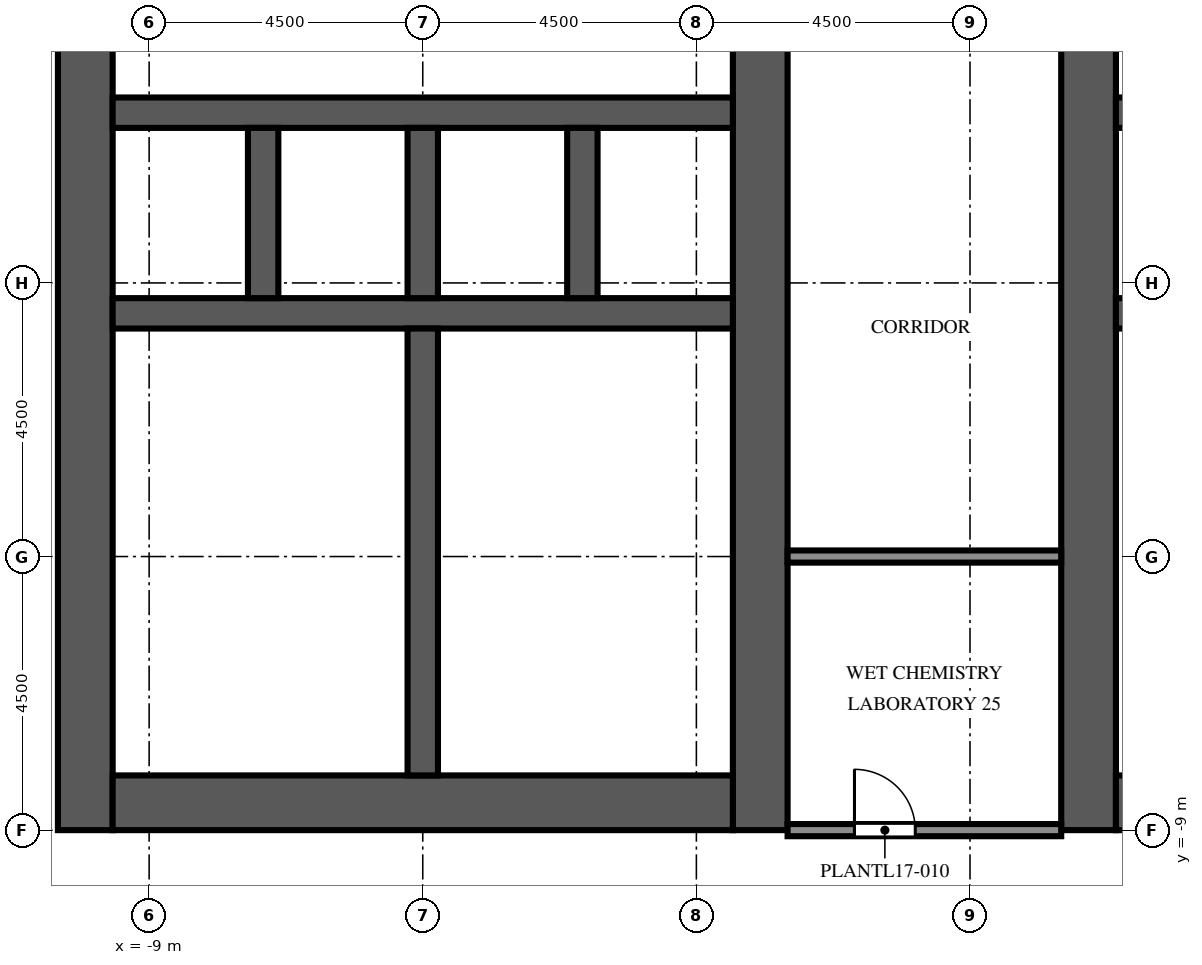
"""IFC4 building model, lengths in metres.
Left out: names, types, materials, properties, quantities, classifications, styles, units other than length and angle.
Written with IfcOpenShell. Run it as: python <this file> out.ifc"""

import sys

from ifc_helpers import new_model, si_unit, direction, frame, frame_2d, origin, place, context, subcontext, project, spatial, rectangle, extrude, element, fill, save


model = new_model("IFC4")
c1 = context("Model", 3, precision=1e-05, world=origin(), true_north=direction((0.0, 1.0)))
c2 = subcontext(c1, "Body", "Model", "MODEL_VIEW")
j1 = project(units=[si_unit("LENGTHUNIT", "METRE"), si_unit("PLANEANGLEUNIT", "RADIAN")], contexts=[c1])
p1 = place(None, origin())
s1 = spatial("IfcSite", under=j1, at=p1, CompositionType="ELEMENT")
p2 = place(p1, origin())
s2 = spatial("IfcBuilding", under=s1, at=p2, CompositionType="ELEMENT")
p3 = place(p2, frame((0.0, 0.0, 76.6)))
s3 = spatial("IfcBuildingStorey", under=s2, at=p3, CompositionType="ELEMENT", Elevation=76.6)
p4 = place(p3, frame((-10.05, -9.0, 0.0), z_axis=(0.0, 0.0, 1.0), x_axis=(0.0, 1.0, 0.0)))
e1 = element("IfcWall", 1, at=p4, inside=s3, PredefinedType="SHEAR", context=c2, shape_type="SweptSolid", body=[
    extrude(rectangle(XDim=27.5, YDim=0.9, at=frame_2d((13.75, 0.0))), origin(), (0.0, 0.0, 1.0), 5.4),
])
p5 = place(p4, frame((12.55, 0.0, 0.0)))
e2 = element("IfcOpeningElement", 2, at=p5, cuts=e1, PredefinedType="OPENING", context=c2, shape_type="SweptSolid", body=[
    extrude(rectangle(XDim=2.4, YDim=2.4, at=frame_2d((1.2, 1.2))), frame((0.0, 0.46, 0.0), z_axis=(0.0, -1.0, 0.0), x_axis=(1.0, 0.0, 0.0)), (0.0, 0.0, 1.0), 0.92),
])
p6 = place(p4, frame((6.825, 0.0, 0.0)))
e3 = element("IfcOpeningElement", 3, at=p6, cuts=e1, PredefinedType="OPENING", context=c2, shape_type="SweptSolid", body=[
    extrude(rectangle(XDim=1.2, YDim=2.1, at=frame_2d((0.6, 1.05))), frame((0.0, 0.46, 0.0), z_axis=(0.0, -1.0, 0.0), x_axis=(1.0, 0.0, 0.0)), (0.0, 0.0, 1.0), 0.92),
])
p7 = place(p4, frame((19.475, 0.0, 0.0)))
e4 = element("IfcOpeningElement", 4, at=p7, cuts=e1, PredefinedType="OPENING", context=c2, shape_type="SweptSolid", body=[
    extrude(rectangle(XDim=1.2, YDim=2.1, at=frame_2d((0.6, 1.05))), frame((0.0, 0.46, 0.0), z_axis=(0.0, -1.0, 0.0), x_axis=(1.0, 0.0, 0.0)), (0.0, 0.0, 1.0), 0.92),
])
p8 = place(p3, frame((1.05, -9.0, 0.0), z_axis=(0.0, 0.0, 1.0), x_axis=(0.0, 1.0, 0.0)))
e5 = element("IfcWall", 5, at=p8, inside=s3, PredefinedType="SHEAR", context=c2, shape_type="SweptSolid", body=[
    extrude(rectangle(XDim=27.5, YDim=0.9, at=frame_2d((13.75, 0.0))), origin(), (0.0, 0.0, 1.0), 5.4),
])
p9 = place(p8, frame((12.55, 0.0, 0.0)))
e6 = element("IfcOpeningElement", 6, at=p9, cuts=e5, PredefinedType="OPENING", context=c2, shape_type="SweptSolid", body=[
    extrude(rectangle(XDim=2.4, YDim=2.4, at=frame_2d((1.2, 1.2))), frame((0.0, 0.46, 0.0), z_axis=(0.0, -1.0, 0.0), x_axis=(1.0, 0.0, 0.0)), (0.0, 0.0, 1.0), 0.92),
])
p10 = place(p8, frame((5.445, 0.0, 0.0)))
e7 = element("IfcOpeningElement", 7, at=p10, cuts=e5, PredefinedType="OPENING", context=c2, shape_type="SweptSolid", body=[
    extrude(rectangle(XDim=1.2, YDim=2.1, at=frame_2d((0.6, 1.05))), frame((0.0, 0.46, 0.0), z_axis=(0.0, -1.0, 0.0), x_axis=(1.0, 0.0, 0.0)), (0.0, 0.0, 1.0), 0.92),
])
p11 = place(p8, frame((19.485, 0.0, 0.0)))
e8 = element("IfcOpeningElement", 8, at=p11, cuts=e5, PredefinedType="OPENING", context=c2, shape_type="SweptSolid", body=[
    extrude(rectangle(XDim=1.0, YDim=2.1, at=frame_2d((0.5, 1.05))), frame((0.0, 0.46, 0.0), z_axis=(0.0, -1.0, 0.0), x_axis=(1.0, 0.0, 0.0)), (0.0, 0.0, 1.0), 0.92),
])
p12 = place(p8, frame((21.139, 0.0, 0.0)))
e9 = element("IfcOpeningElement", 9, at=p12, cuts=e5, PredefinedType="OPENING", context=c2, shape_type="SweptSolid", body=[
    extrude(rectangle(XDim=1.0, YDim=2.1, at=frame_2d((0.5, 1.05))), frame((0.0, 0.46, 0.0), z_axis=(0.0, -1.0, 0.0), x_axis=(1.0, 0.0, 0.0)), (0.0, 0.0, 1.0), 0.92),
])
p13 = place(p8, frame((23.16, 0.0, 0.0)))
e10 = element("IfcOpeningElement", 10, at=p13, cuts=e5, PredefinedType="OPENING", context=c2, shape_type="SweptSolid", body=[
    extrude(rectangle(XDim=1.0, YDim=2.1, at=frame_2d((0.5, 1.05))), frame((0.0, 0.46, 0.0), z_axis=(0.0, -1.0, 0.0), x_axis=(1.0, 0.0, 0.0)), (0.0, 0.0, 1.0), 0.92),
])
p14 = place(p8, frame((25.181, 0.0, 0.0)))
e11 = element("IfcOpeningElement", 11, at=p14, cuts=e5, PredefinedType="OPENING", context=c2, shape_type="SweptSolid", body=[
    extrude(rectangle(XDim=1.0, YDim=2.1, at=frame_2d((0.5, 1.05))), frame((0.0, 0.46, 0.0), z_axis=(0.0, -1.0, 0.0), x_axis=(1.0, 0.0, 0.0)), (0.0, 0.0, 1.0), 0.92),
])
p15 = place(p3, frame((-9.6, -8.55, 0.0), z_axis=(0.0, 0.0, 1.0), x_axis=(1.0, 0.0, 0.0)))
e12 = element("IfcWall", 12, at=p15, inside=s3, PredefinedType="SHEAR", context=c2, shape_type="SweptSolid", body=[
    extrude(rectangle(XDim=10.2, YDim=0.9, at=frame_2d((5.1, 0.0))), origin(), (0.0, 0.0, 1.0), 5.4),
])
p16 = place(p3, frame((-9.6, -0.5, 0.0), z_axis=(0.0, 0.0, 1.0), x_axis=(1.0, 0.0, 0.0)))
e13 = element("IfcWall", 13, at=p16, inside=s3, PredefinedType="SHEAR", context=c2, shape_type="SweptSolid", body=[
    extrude(rectangle(XDim=10.2, YDim=0.5, at=frame_2d((5.1, 0.0))), origin(), (0.0, 0.0, 1.0), 5.4),
])
p17 = place(p3, frame((-9.6, 2.8, 0.0), z_axis=(0.0, 0.0, 1.0), x_axis=(1.0, 0.0, 0.0)))
e14 = element("IfcWall", 14, at=p17, inside=s3, PredefinedType="SHEAR", context=c2, shape_type="SweptSolid", body=[
    extrude(rectangle(XDim=10.2, YDim=0.5, at=frame_2d((5.1, 0.0))), origin(), (0.0, 0.0, 1.0), 5.4),
])
p18 = place(p17, frame((0.562, 0.0, 0.0)))
e15 = element("IfcOpeningElement", 15, at=p18, cuts=e14, PredefinedType="OPENING", context=c2, shape_type="SweptSolid", body=[
    extrude(rectangle(XDim=1.1, YDim=2.1, at=frame_2d((0.55, 1.05))), frame((0.0, 0.26, 0.0), z_axis=(0.0, -1.0, 0.0), x_axis=(1.0, 0.0, 0.0)), (0.0, 0.0, 1.0), 0.52),
])
p19 = place(p17, frame((3.238, 0.0, 0.0)))
e16 = element("IfcOpeningElement", 16, at=p19, cuts=e14, PredefinedType="OPENING", context=c2, shape_type="SweptSolid", body=[
    extrude(rectangle(XDim=1.1, YDim=2.1, at=frame_2d((0.55, 1.05))), frame((0.0, 0.26, 0.0), z_axis=(0.0, -1.0, 0.0), x_axis=(1.0, 0.0, 0.0)), (0.0, 0.0, 1.0), 0.52),
])
p20 = place(p17, frame((8.538, 0.0, 0.0)))
e17 = element("IfcOpeningElement", 17, at=p20, cuts=e14, PredefinedType="OPENING", context=c2, shape_type="SweptSolid", body=[
    extrude(rectangle(XDim=1.1, YDim=2.1, at=frame_2d((0.55, 1.05))), frame((0.0, 0.26, 0.0), z_axis=(0.0, -1.0, 0.0), x_axis=(1.0, 0.0, 0.0)), (0.0, 0.0, 1.0), 0.52),
])
for number, where, z_axis, x_axis in (
    (18, (-7.125, -0.25, 0.0), (0.0, 0.0, 1.0), (0.0, 1.0, 0.0)),
    (19, (-4.5, -0.25, 0.0), (0.0, 0.0, 1.0), (0.0, 1.0, 0.0)),
    (20, (-1.875, -0.25, 0.0), (0.0, 0.0, 1.0), (0.0, 1.0, 0.0)),
):
    element("IfcWall", number, at=place(p3, frame(where, z_axis=z_axis, x_axis=x_axis)), inside=s3, PredefinedType="SHEAR", context=c2, shape_type="SweptSolid", body=[
        extrude(rectangle(XDim=2.8, YDim=0.5, at=frame_2d((1.4, 0.0))), origin(), (0.0, 0.0, 1.0), 5.4),
    ])
p21 = place(p3, frame((-4.5, -8.1, 0.0), z_axis=(0.0, 0.0, 1.0), x_axis=(0.0, 1.0, 0.0)))
e21 = element("IfcWall", 21, at=p21, inside=s3, PredefinedType="SHEAR", context=c2, shape_type="SweptSolid", body=[
    extrude(rectangle(XDim=7.35, YDim=0.5, at=frame_2d((3.675, 0.0))), origin(), (0.0, 0.0, 1.0), 5.4),
])
p22 = place(p3, frame((6.45, -9.0, 0.0), z_axis=(0.0, 0.0, 1.0), x_axis=(0.0, 1.0, 0.0)))
e22 = element("IfcWall", 22, at=p22, inside=s3, PredefinedType="SHEAR", context=c2, shape_type="SweptSolid", body=[
    extrude(rectangle(XDim=27.5, YDim=0.9, at=frame_2d((13.75, 0.0))), origin(), (0.0, 0.0, 1.0), 5.4),
])
p23 = place(p22, frame((12.55, 0.0, 0.0)))
e23 = element("IfcOpeningElement", 23, at=p23, cuts=e22, PredefinedType="OPENING", context=c2, shape_type="SweptSolid", body=[
    extrude(rectangle(XDim=2.4, YDim=2.4, at=frame_2d((1.2, 1.2))), frame((0.0, 0.46, 0.0), z_axis=(0.0, -1.0, 0.0), x_axis=(1.0, 0.0, 0.0)), (0.0, 0.0, 1.0), 0.92),
])
p24 = place(p22, frame((5.445, 0.0, 0.0)))
e24 = element("IfcOpeningElement", 24, at=p24, cuts=e22, PredefinedType="OPENING", context=c2, shape_type="SweptSolid", body=[
    extrude(rectangle(XDim=1.2, YDim=2.1, at=frame_2d((0.6, 1.05))), frame((0.0, 0.46, 0.0), z_axis=(0.0, -1.0, 0.0), x_axis=(1.0, 0.0, 0.0)), (0.0, 0.0, 1.0), 0.92),
])
p25 = place(p22, frame((19.485, 0.0, 0.0)))
e25 = element("IfcOpeningElement", 25, at=p25, cuts=e22, PredefinedType="OPENING", context=c2, shape_type="SweptSolid", body=[
    extrude(rectangle(XDim=1.0, YDim=2.1, at=frame_2d((0.5, 1.05))), frame((0.0, 0.46, 0.0), z_axis=(0.0, -1.0, 0.0), x_axis=(1.0, 0.0, 0.0)), (0.0, 0.0, 1.0), 0.92),
])
p26 = place(p22, frame((21.139, 0.0, 0.0)))
e26 = element("IfcOpeningElement", 26, at=p26, cuts=e22, PredefinedType="OPENING", context=c2, shape_type="SweptSolid", body=[
    extrude(rectangle(XDim=1.0, YDim=2.1, at=frame_2d((0.5, 1.05))), frame((0.0, 0.46, 0.0), z_axis=(0.0, -1.0, 0.0), x_axis=(1.0, 0.0, 0.0)), (0.0, 0.0, 1.0), 0.92),
])
p27 = place(p22, frame((23.16, 0.0, 0.0)))
e27 = element("IfcOpeningElement", 27, at=p27, cuts=e22, PredefinedType="OPENING", context=c2, shape_type="SweptSolid", body=[
    extrude(rectangle(XDim=1.0, YDim=2.1, at=frame_2d((0.5, 1.05))), frame((0.0, 0.46, 0.0), z_axis=(0.0, -1.0, 0.0), x_axis=(1.0, 0.0, 0.0)), (0.0, 0.0, 1.0), 0.92),
])
p28 = place(p22, frame((25.181, 0.0, 0.0)))
e28 = element("IfcOpeningElement", 28, at=p28, cuts=e22, PredefinedType="OPENING", context=c2, shape_type="SweptSolid", body=[
    extrude(rectangle(XDim=1.0, YDim=2.1, at=frame_2d((0.5, 1.05))), frame((0.0, 0.46, 0.0), z_axis=(0.0, -1.0, 0.0), x_axis=(1.0, 0.0, 0.0)), (0.0, 0.0, 1.0), 0.92),
])
p29 = place(p3, frame((6.9, -8.55, 0.0), z_axis=(0.0, 0.0, 1.0), x_axis=(1.0, 0.0, 0.0)))
e29 = element("IfcWall", 29, at=p29, inside=s3, PredefinedType="SHEAR", context=c2, shape_type="SweptSolid", body=[
    extrude(rectangle(XDim=10.2, YDim=0.9, at=frame_2d((5.1, 0.0))), origin(), (0.0, 0.0, 1.0), 5.4),
])
p30 = place(p3, frame((6.9, -0.5, 0.0), z_axis=(0.0, 0.0, 1.0), x_axis=(1.0, 0.0, 0.0)))
e30 = element("IfcWall", 30, at=p30, inside=s3, PredefinedType="SHEAR", context=c2, shape_type="SweptSolid", body=[
    extrude(rectangle(XDim=10.2, YDim=0.5, at=frame_2d((5.1, 0.0))), origin(), (0.0, 0.0, 1.0), 5.4),
])
p31 = place(p3, frame((6.9, 2.8, 0.0), z_axis=(0.0, 0.0, 1.0), x_axis=(1.0, 0.0, 0.0)))
e31 = element("IfcWall", 31, at=p31, inside=s3, PredefinedType="SHEAR", context=c2, shape_type="SweptSolid", body=[
    extrude(rectangle(XDim=10.2, YDim=0.5, at=frame_2d((5.1, 0.0))), origin(), (0.0, 0.0, 1.0), 5.4),
])
p32 = place(p31, frame((0.562, 0.0, 0.0)))
e32 = element("IfcOpeningElement", 32, at=p32, cuts=e31, PredefinedType="OPENING", context=c2, shape_type="SweptSolid", body=[
    extrude(rectangle(XDim=1.1, YDim=2.1, at=frame_2d((0.55, 1.05))), frame((0.0, 0.26, 0.0), z_axis=(0.0, -1.0, 0.0), x_axis=(1.0, 0.0, 0.0)), (0.0, 0.0, 1.0), 0.52),
])
p33 = place(p31, frame((3.238, 0.0, 0.0)))
e33 = element("IfcOpeningElement", 33, at=p33, cuts=e31, PredefinedType="OPENING", context=c2, shape_type="SweptSolid", body=[
    extrude(rectangle(XDim=1.1, YDim=2.1, at=frame_2d((0.55, 1.05))), frame((0.0, 0.26, 0.0), z_axis=(0.0, -1.0, 0.0), x_axis=(1.0, 0.0, 0.0)), (0.0, 0.0, 1.0), 0.52),
])
p34 = place(p31, frame((8.538, 0.0, 0.0)))
e34 = element("IfcOpeningElement", 34, at=p34, cuts=e31, PredefinedType="OPENING", context=c2, shape_type="SweptSolid", body=[
    extrude(rectangle(XDim=1.1, YDim=2.1, at=frame_2d((0.55, 1.05))), frame((0.0, 0.26, 0.0), z_axis=(0.0, -1.0, 0.0), x_axis=(1.0, 0.0, 0.0)), (0.0, 0.0, 1.0), 0.52),
])
p35 = place(p3, frame((-0.9, -5.16, 0.0), z_axis=(0.0, 0.0, 1.0), x_axis=(1.0, 0.0, 0.0)))
e35 = element("IfcWall", 35, at=p35, inside=s3, PredefinedType="PARTITIONING", context=c2, shape_type="SweptSolid", body=[
    extrude(rectangle(XDim=1.5, YDim=0.1, at=frame_2d((0.75, 0.0))), origin(), (0.0, 0.0, 1.0), 4.95),
])
p36 = place(p35, frame((0.25, 0.0, 0.0)))
e36 = element("IfcOpeningElement", 36, at=p36, cuts=e35, PredefinedType="OPENING", context=c2, shape_type="SweptSolid", body=[
    extrude(rectangle(XDim=1.0, YDim=2.1, at=frame_2d((0.5, 1.05))), frame((0.0, 0.06, 0.0), z_axis=(0.0, -1.0, 0.0), x_axis=(1.0, 0.0, 0.0)), (0.0, 0.0, 1.0), 0.12),
])
p37 = place(p3, frame((-0.9, -5.16, 0.0), z_axis=(0.0, 0.0, 1.0), x_axis=(0.0, 1.0, 0.0)))
e37 = element("IfcWall", 37, at=p37, inside=s3, PredefinedType="PARTITIONING", context=c2, shape_type="SweptSolid", body=[
    extrude(rectangle(XDim=2.205, YDim=0.1, at=frame_2d((1.103, 0.0))), origin(), (0.0, 0.0, 1.0), 4.95),
])
p38 = place(p37, frame((0.603, 0.0, 0.0)))
e38 = element("IfcOpeningElement", 38, at=p38, cuts=e37, PredefinedType="OPENING", context=c2, shape_type="SweptSolid", body=[
    extrude(rectangle(XDim=1.0, YDim=2.1, at=frame_2d((0.5, 1.05))), frame((0.0, 0.06, 0.0), z_axis=(0.0, -1.0, 0.0), x_axis=(1.0, 0.0, 0.0)), (0.0, 0.0, 1.0), 0.12),
])
p39 = place(p3, frame((-0.9, -2.955, 0.0), z_axis=(0.0, 0.0, 1.0), x_axis=(0.0, 1.0, 0.0)))
e39 = element("IfcWall", 39, at=p39, inside=s3, PredefinedType="PARTITIONING", context=c2, shape_type="SweptSolid", body=[
    extrude(rectangle(XDim=2.205, YDim=0.1, at=frame_2d((1.103, 0.0))), origin(), (0.0, 0.0, 1.0), 4.95),
])
p40 = place(p39, frame((0.603, 0.0, 0.0)))
e40 = element("IfcOpeningElement", 40, at=p40, cuts=e39, PredefinedType="OPENING", context=c2, shape_type="SweptSolid", body=[
    extrude(rectangle(XDim=1.0, YDim=2.1, at=frame_2d((0.5, 1.05))), frame((0.0, 0.06, 0.0), z_axis=(0.0, -1.0, 0.0), x_axis=(1.0, 0.0, 0.0)), (0.0, 0.0, 1.0), 0.12),
])
for number, where, z_axis, x_axis in (
    (41, (-4.25, -5.16, 0.0), (0.0, 0.0, 1.0), (1.0, 0.0, 0.0)),
    (42, (-4.25, -2.955, 0.0), (0.0, 0.0, 1.0), (1.0, 0.0, 0.0)),
):
    element("IfcWall", number, at=place(p3, frame(where, z_axis=z_axis, x_axis=x_axis)), inside=s3, PredefinedType="PARTITIONING", context=c2, shape_type="SweptSolid", body=[
        extrude(rectangle(XDim=3.35, YDim=0.1, at=frame_2d((1.675, 0.0))), origin(), (0.0, 0.0, 1.0), 4.95),
    ])
p41 = place(p3, frame((6.9, -5.16, 0.0), z_axis=(0.0, 0.0, 1.0), x_axis=(1.0, 0.0, 0.0)))
e43 = element("IfcWall", 43, at=p41, inside=s3, PredefinedType="PARTITIONING", context=c2, shape_type="SweptSolid", body=[
    extrude(rectangle(XDim=1.5, YDim=0.1, at=frame_2d((0.75, 0.0))), origin(), (0.0, 0.0, 1.0), 4.95),
])
p42 = place(p41, frame((0.25, 0.0, 0.0)))
e44 = element("IfcOpeningElement", 44, at=p42, cuts=e43, PredefinedType="OPENING", context=c2, shape_type="SweptSolid", body=[
    extrude(rectangle(XDim=1.0, YDim=2.1, at=frame_2d((0.5, 1.05))), frame((0.0, 0.06, 0.0), z_axis=(0.0, -1.0, 0.0), x_axis=(1.0, 0.0, 0.0)), (0.0, 0.0, 1.0), 0.12),
])
p43 = place(p3, frame((1.5, -9.0, 0.0), z_axis=(0.0, 0.0, 1.0), x_axis=(1.0, 0.0, 0.0)))
e45 = element("IfcWall", 45, at=p43, inside=s3, PredefinedType="PARTITIONING", context=c2, shape_type="SweptSolid", body=[
    extrude(rectangle(XDim=4.5, YDim=0.2, at=frame_2d((2.25, 0.0))), origin(), (0.0, 0.0, 1.0), 4.95),
])
p44 = place(p43, frame((1.1, 0.0, 0.0)))
e46 = element("IfcOpeningElement", 46, at=p44, cuts=e45, PredefinedType="OPENING", context=c2, shape_type="SweptSolid", body=[
    extrude(rectangle(XDim=1.0, YDim=2.1, at=frame_2d((0.5, 1.05))), frame((0.0, 0.11, 0.0), z_axis=(0.0, -1.0, 0.0), x_axis=(1.0, 0.0, 0.0)), (0.0, 0.0, 1.0), 0.22),
])
p45 = place(p3, frame((1.5, -4.5, 0.0), z_axis=(0.0, 0.0, 1.0), x_axis=(1.0, 0.0, 0.0)))
e47 = element("IfcWall", 47, at=p45, inside=s3, PredefinedType="PARTITIONING", context=c2, shape_type="SweptSolid", body=[
    extrude(rectangle(XDim=4.5, YDim=0.2, at=frame_2d((2.25, 0.0))), origin(), (0.0, 0.0, 1.0), 4.95),
])
p46 = place(p18, origin())
e48 = element("IfcDoor", 48, at=p46, inside=s3, OperationType="DOUBLE_DOOR_SLIDING", PredefinedType="DOOR", context=c2, shape_type="SweptSolid", body=[
    extrude(rectangle(XDim=1.1, YDim=2.1, at=frame_2d((0.55, 1.05))), frame((0.0, 0.025, 0.0), z_axis=(0.0, -1.0, 0.0), x_axis=(1.0, 0.0, 0.0)), (0.0, 0.0, 1.0), 0.05),
])
fill(e15, e48)
p47 = place(p19, origin())
e49 = element("IfcDoor", 49, at=p47, inside=s3, OperationType="DOUBLE_DOOR_SLIDING", PredefinedType="DOOR", context=c2, shape_type="SweptSolid", body=[
    extrude(rectangle(XDim=1.1, YDim=2.1, at=frame_2d((0.55, 1.05))), frame((0.0, 0.025, 0.0), z_axis=(0.0, -1.0, 0.0), x_axis=(1.0, 0.0, 0.0)), (0.0, 0.0, 1.0), 0.05),
])
fill(e16, e49)
p48 = place(p20, origin())
e50 = element("IfcDoor", 50, at=p48, inside=s3, OperationType="DOUBLE_DOOR_SLIDING", PredefinedType="DOOR", context=c2, shape_type="SweptSolid", body=[
    extrude(rectangle(XDim=1.1, YDim=2.1, at=frame_2d((0.55, 1.05))), frame((0.0, 0.025, 0.0), z_axis=(0.0, -1.0, 0.0), x_axis=(1.0, 0.0, 0.0)), (0.0, 0.0, 1.0), 0.05),
])
fill(e17, e50)
p49 = place(p5, origin())
e51 = element("IfcDoor", 51, at=p49, inside=s3, OperationType="DOUBLE_DOOR_DOUBLE_SWING", PredefinedType="DOOR", context=c2, shape_type="SweptSolid", body=[
    extrude(rectangle(XDim=2.4, YDim=2.4, at=frame_2d((1.2, 1.2))), frame((0.0, 0.025, 0.0), z_axis=(0.0, -1.0, 0.0), x_axis=(1.0, 0.0, 0.0)), (0.0, 0.0, 1.0), 0.05),
])
fill(e2, e51)
p50 = place(p9, origin())
e52 = element("IfcDoor", 52, at=p50, inside=s3, OperationType="DOUBLE_DOOR_DOUBLE_SWING", PredefinedType="DOOR", context=c2, shape_type="SweptSolid", body=[
    extrude(rectangle(XDim=2.4, YDim=2.4, at=frame_2d((1.2, 1.2))), frame((0.0, 0.025, 0.0), z_axis=(0.0, -1.0, 0.0), x_axis=(1.0, 0.0, 0.0)), (0.0, 0.0, 1.0), 0.05),
])
fill(e6, e52)
p51 = place(p23, origin())
e53 = element("IfcDoor", 53, at=p51, inside=s3, OperationType="DOUBLE_DOOR_DOUBLE_SWING", PredefinedType="DOOR", context=c2, shape_type="SweptSolid", body=[
    extrude(rectangle(XDim=2.4, YDim=2.4, at=frame_2d((1.2, 1.2))), frame((0.0, 0.025, 0.0), z_axis=(0.0, -1.0, 0.0), x_axis=(1.0, 0.0, 0.0)), (0.0, 0.0, 1.0), 0.05),
])
fill(e23, e53)
p52 = place(p6, origin())
e54 = element("IfcDoor", 54, at=p52, inside=s3, OperationType="SINGLE_SWING_LEFT", PredefinedType="DOOR", context=c2, shape_type="SweptSolid", body=[
    extrude(rectangle(XDim=1.2, YDim=2.1, at=frame_2d((0.6, 1.05))), frame((0.0, 0.025, 0.0), z_axis=(0.0, -1.0, 0.0), x_axis=(1.0, 0.0, 0.0)), (0.0, 0.0, 1.0), 0.05),
])
fill(e3, e54)
p53 = place(p10, origin())
e55 = element("IfcDoor", 55, at=p53, inside=s3, OperationType="SINGLE_SWING_LEFT", PredefinedType="DOOR", context=c2, shape_type="SweptSolid", body=[
    extrude(rectangle(XDim=1.2, YDim=2.1, at=frame_2d((0.6, 1.05))), frame((0.0, 0.425, 0.0), z_axis=(0.0, -1.0, 0.0), x_axis=(1.0, 0.0, 0.0)), (0.0, 0.0, 1.0), 0.05),
])
fill(e7, e55)
p54 = place(p36, origin())
e56 = element("IfcDoor", 56, at=p54, inside=s3, OperationType="SINGLE_SWING_RIGHT", PredefinedType="DOOR", context=c2, shape_type="SweptSolid", body=[
    extrude(rectangle(XDim=1.0, YDim=2.1, at=frame_2d((0.5, 1.05))), frame((0.0, 0.025, 0.0), z_axis=(0.0, -1.0, 0.0), x_axis=(1.0, 0.0, 0.0)), (0.0, 0.0, 1.0), 0.05),
])
fill(e36, e56)
p55 = place(p38, origin())
e57 = element("IfcDoor", 57, at=p55, inside=s3, OperationType="SINGLE_SWING_LEFT", PredefinedType="DOOR", context=c2, shape_type="SweptSolid", body=[
    extrude(rectangle(XDim=1.0, YDim=2.1, at=frame_2d((0.5, 1.05))), frame((0.0, 0.025, 0.0), z_axis=(0.0, -1.0, 0.0), x_axis=(1.0, 0.0, 0.0)), (0.0, 0.0, 1.0), 0.05),
])
fill(e38, e57)
p56 = place(p40, origin())
e58 = element("IfcDoor", 58, at=p56, inside=s3, OperationType="SINGLE_SWING_RIGHT", PredefinedType="DOOR", context=c2, shape_type="SweptSolid", body=[
    extrude(rectangle(XDim=1.0, YDim=2.1, at=frame_2d((0.5, 1.05))), frame((0.0, 0.025, 0.0), z_axis=(0.0, -1.0, 0.0), x_axis=(1.0, 0.0, 0.0)), (0.0, 0.0, 1.0), 0.05),
])
fill(e40, e58)
p57 = place(p24, origin())
e59 = element("IfcDoor", 59, at=p57, inside=s3, OperationType="SINGLE_SWING_RIGHT", PredefinedType="DOOR", context=c2, shape_type="SweptSolid", body=[
    extrude(rectangle(XDim=1.2, YDim=2.1, at=frame_2d((0.6, 1.05))), frame((0.0, -0.375, 0.0), z_axis=(0.0, -1.0, 0.0), x_axis=(1.0, 0.0, 0.0)), (0.0, 0.0, 1.0), 0.05),
])
fill(e24, e59)
p58 = place(p44, origin())
e60 = element("IfcDoor", 60, at=p58, inside=s3, OperationType="SINGLE_SWING_LEFT", PredefinedType="DOOR", context=c2, shape_type="SweptSolid", body=[
    extrude(rectangle(XDim=1.0, YDim=2.1, at=frame_2d((0.5, 1.05))), frame((0.0, 0.025, 0.0), z_axis=(0.0, -1.0, 0.0), x_axis=(1.0, 0.0, 0.0)), (0.0, 0.0, 1.0), 0.05),
])
fill(e46, e60)
save(model, sys.argv[1])
